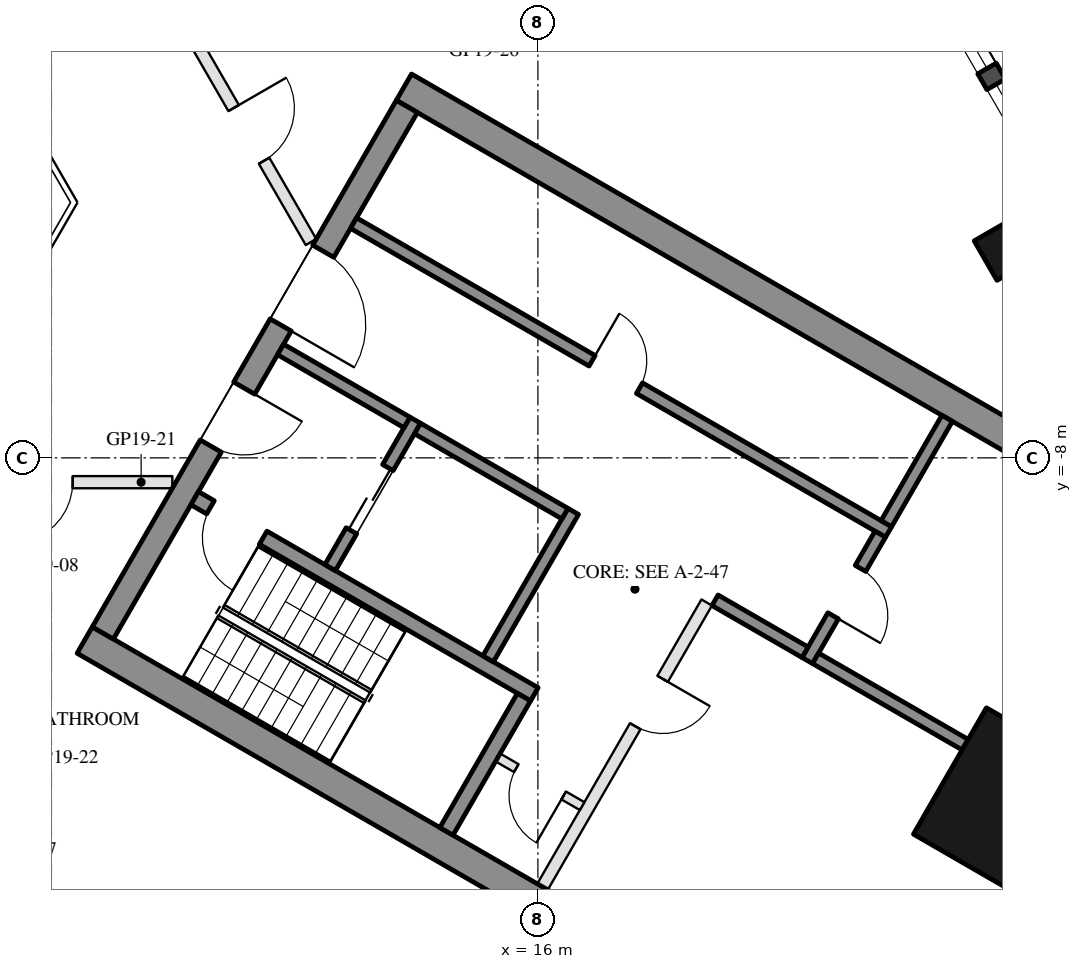
"""IFC4 building model, lengths in metres.
Left out: names, types, materials, properties, quantities, classifications, styles, units other than length and angle.
Written with IfcOpenShell. Run it as: python <this file> out.ifc"""

import sys

from ifc_helpers import new_model, si_unit, direction, frame, frame_2d, origin, origin_2d, place, context, subcontext, project, spatial, rectangle, hollow_rectangle, extrude, element, fill, save


model = new_model("IFC4")
c1 = context("Model", 3, precision=1e-05, world=origin(), true_north=direction((0.0, 1.0)))
c2 = subcontext(c1, "Body", "Model", "MODEL_VIEW")
j1 = project(units=[si_unit("LENGTHUNIT", "METRE"), si_unit("PLANEANGLEUNIT", "RADIAN")], contexts=[c1])
p1 = place(None, origin())
s1 = spatial("IfcSite", under=j1, at=p1, CompositionType="ELEMENT")
p2 = place(p1, origin())
s2 = spatial("IfcBuilding", under=s1, at=p2, CompositionType="ELEMENT")
p3 = place(p2, frame((0.0, 0.0, 205.8)))
s3 = spatial("IfcBuildingStorey", under=s2, at=p3, CompositionType="ELEMENT", Elevation=205.8)
p4 = place(p3, frame((23.688, -4.568, 0.0), z_axis=(0.0, 0.0, 1.0), x_axis=(-0.5, 0.866025403784, 0.0)))
e1 = element("IfcColumn", 1, at=p4, inside=s3, PredefinedType="COLUMN", context=c2, shape_type="SweptSolid", body=[
    extrude(hollow_rectangle(XDim=0.75, YDim=0.75, WallThickness=0.035, at=origin_2d()), origin(), (0.0, 0.0, 1.0), 3.7),
])
p5 = place(p3, frame((23.729, -13.7, 0.0), z_axis=(0.0, 0.0, 1.0), x_axis=(0.5, 0.866025403784, 0.0)))
e2 = element("IfcColumn", 2, at=p5, inside=s3, PredefinedType="COLUMN", context=c2, shape_type="SweptSolid", body=[
    extrude(hollow_rectangle(XDim=2.4, YDim=2.2, WallThickness=0.06, at=origin_2d()), origin(), (0.0, 0.0, 1.0), 3.7),
])
p6 = place(p3, frame((23.427, -16.792, 0.0), z_axis=(0.0, 0.0, 1.0), x_axis=(0.500018773155, 0.866014564827, 0.0)))
e3 = element("IfcWall", 3, at=p6, inside=s3, PredefinedType="SOLIDWALL", context=c2, shape_type="SweptSolid", body=[
    extrude(rectangle(XDim=5.658, YDim=0.35, at=frame_2d((2.829, 0.0))), origin(), (0.0, 0.0, 1.0), 3.55),
])
p7 = place(p3, frame((26.257, -6.567, 0.0), z_axis=(0.0, 0.0, 1.0), x_axis=(-0.500023526245, 0.866011820475, 0.0)))
e4 = element("IfcWall", 4, at=p7, inside=s3, PredefinedType="SOLIDWALL", context=c2, shape_type="SweptSolid", body=[
    extrude(rectangle(XDim=11.816, YDim=0.35, at=frame_2d((5.908, 0.0))), origin(), (0.0, 0.0, 1.0), 3.55),
])
p8 = place(p7, frame((0.38, 0.0, 0.3)))
e5 = element("IfcOpeningElement", 5, at=p8, cuts=e4, PredefinedType="OPENING", context=c2, shape_type="SweptSolid", body=[
    extrude(rectangle(XDim=1.9, YDim=2.65, at=frame_2d((0.95, 1.325))), frame((0.0, 0.185, 0.0), z_axis=(0.0, -1.0, 0.0), x_axis=(1.0, 0.0, 0.0)), (0.0, 0.0, 1.0), 0.37),
])
p9 = place(p7, frame((7.791, 0.0, 0.0)))
e6 = element("IfcOpeningElement", 6, at=p9, cuts=e4, PredefinedType="OPENING", context=c2, shape_type="SweptSolid", body=[
    extrude(rectangle(XDim=2.4, YDim=2.4, at=frame_2d((1.2, 1.2))), frame((0.0, 0.185, 0.0), z_axis=(0.0, -1.0, 0.0), x_axis=(1.0, 0.0, 0.0)), (0.0, 0.0, 1.0), 0.37),
])
p10 = place(p7, frame((3.741, 0.0, 0.3)))
e7 = element("IfcOpeningElement", 7, at=p10, cuts=e4, PredefinedType="OPENING", context=c2, shape_type="SweptSolid", body=[
    extrude(rectangle(XDim=1.7, YDim=2.65, at=frame_2d((0.85, 1.325))), frame((0.0, 0.185, 0.0), z_axis=(0.0, -1.0, 0.0), x_axis=(1.0, 0.0, 0.0)), (0.0, 0.0, 1.0), 0.37),
])
p11 = place(p7, frame((5.741, 0.0, 0.3)))
e8 = element("IfcOpeningElement", 8, at=p11, cuts=e4, PredefinedType="OPENING", context=c2, shape_type="SweptSolid", body=[
    extrude(rectangle(XDim=1.7, YDim=2.65, at=frame_2d((0.85, 1.325))), frame((0.0, 0.185, 0.0), z_axis=(0.0, -1.0, 0.0), x_axis=(1.0, 0.0, 0.0)), (0.0, 0.0, 1.0), 0.37),
])
for number, where, z_axis, x_axis in (
    (9, (8.547, -10.997, 0.0), (0.0, 0.0, 1.0), (0.866, -0.5, 0.0)),
    (10, (13.797, -1.903, 0.0), (0.0, 0.0, 1.0), (0.866, -0.5, 0.0)),
):
    element("IfcWall", number, at=place(p3, frame(where, z_axis=z_axis, x_axis=x_axis)), inside=s3, PredefinedType="SHEAR", context=c2, shape_type="SweptSolid", body=[
        extrude(rectangle(XDim=14.837, YDim=0.5, at=frame_2d((7.418, 0.0))), origin(), (0.0, 0.0, 1.0), 3.5),
    ])
p12 = place(p3, frame((8.845, -10.88, 0.0), z_axis=(0.0, 0.0, 1.0), x_axis=(0.500004234368, 0.866022959057, 0.0)))
e11 = element("IfcWall", 11, at=p12, inside=s3, PredefinedType="SHEAR", context=c2, shape_type="SweptSolid", body=[
    extrude(rectangle(XDim=10.0, YDim=0.4, at=frame_2d((5.0, 0.0))), origin(), (0.0, 0.0, 1.0), 3.5),
])
p13 = place(p12, frame((3.55, 0.0, 0.0)))
e12 = element("IfcOpeningElement", 12, at=p13, cuts=e11, PredefinedType="OPENING", context=c2, shape_type="SweptSolid", body=[
    extrude(rectangle(XDim=1.1, YDim=2.1, at=frame_2d((0.55, 1.05))), frame((0.0, 0.21, 0.0), z_axis=(0.0, -1.0, 0.0), x_axis=(1.0, 0.0, 0.0)), (0.0, 0.0, 1.0), 0.42),
])
p14 = place(p12, frame((5.85, 0.0, 0.0)))
e13 = element("IfcOpeningElement", 13, at=p14, cuts=e11, PredefinedType="OPENING", context=c2, shape_type="SweptSolid", body=[
    extrude(rectangle(XDim=1.4, YDim=2.1, at=frame_2d((0.7, 1.05))), frame((0.0, 0.21, 0.0), z_axis=(0.0, -1.0, 0.0), x_axis=(1.0, 0.0, 0.0)), (0.0, 0.0, 1.0), 0.42),
])
p15 = place(p3, frame((10.356, -8.664, 0.0), z_axis=(0.0, 0.0, 1.0), x_axis=(0.866028629588, -0.499994412703, 0.0)))
e14 = element("IfcWall", 14, at=p15, inside=s3, PredefinedType="SHEAR", context=c2, shape_type="SweptSolid", body=[
    extrude(rectangle(XDim=6.45, YDim=0.25, at=frame_2d((3.225, 0.0))), origin(), (0.0, 0.0, 1.0), 3.5),
])
p16 = place(p15, frame((0.3, 0.0, 0.0)))
e15 = element("IfcOpeningElement", 15, at=p16, cuts=e14, PredefinedType="OPENING", context=c2, shape_type="SweptSolid", body=[
    extrude(rectangle(XDim=1.0, YDim=2.1, at=frame_2d((0.5, 1.05))), frame((0.0, 0.135, 0.0), z_axis=(0.0, -1.0, 0.0), x_axis=(1.0, 0.0, 0.0)), (0.0, 0.0, 1.0), 0.27),
])
p17 = place(p3, frame((14.496, -14.143, 0.0), z_axis=(0.0, 0.0, 1.0), x_axis=(0.500062241894, 0.865989465428, 0.0)))
e16 = element("IfcWall", 16, at=p17, inside=s3, PredefinedType="SHEAR", context=c2, shape_type="SweptSolid", body=[
    extrude(rectangle(XDim=2.55, YDim=0.25, at=frame_2d((1.275, 0.0))), origin(), (0.0, 0.0, 1.0), 3.5),
])
p18 = place(p3, frame((15.181, -11.305, 0.0), z_axis=(0.0, 0.0, 1.0), x_axis=(0.49994636267, 0.866056369097, 0.0)))
e17 = element("IfcWall", 17, at=p18, inside=s3, PredefinedType="SHEAR", context=c2, shape_type="SweptSolid", body=[
    extrude(rectangle(XDim=2.8, YDim=0.2, at=frame_2d((1.4, 0.0))), origin(), (0.0, 0.0, 1.0), 3.5),
])
p19 = place(p3, frame((12.583, -9.805, 0.0), z_axis=(0.0, 0.0, 1.0), x_axis=(0.49994636267, 0.866056369097, 0.0)))
e18 = element("IfcWall", 18, at=p19, inside=s3, PredefinedType="SHEAR", context=c2, shape_type="SweptSolid", body=[
    extrude(rectangle(XDim=2.8, YDim=0.2, at=frame_2d((1.4, 0.0))), origin(), (0.0, 0.0, 1.0), 3.5),
])
p20 = place(p19, frame((0.7, 0.0, 0.0)))
e19 = element("IfcOpeningElement", 19, at=p20, cuts=e18, PredefinedType="OPENING", context=c2, shape_type="SweptSolid", body=[
    extrude(rectangle(XDim=1.2, YDim=2.1, at=frame_2d((0.6, 1.05))), frame((0.0, 0.11, 0.0), z_axis=(0.0, -1.0, 0.0), x_axis=(1.0, 0.0, 0.0)), (0.0, 0.0, 1.0), 0.22),
])
p21 = place(p3, frame((11.768, -6.217, 0.0), z_axis=(0.0, 0.0, 1.0), x_axis=(0.866050077142, -0.499957262057, 0.0)))
e20 = element("IfcWall", 20, at=p21, inside=s3, PredefinedType="SHEAR", context=c2, shape_type="SweptSolid", body=[
    extrude(rectangle(XDim=2.4, YDim=0.2, at=frame_2d((1.2, 0.0))), origin(), (0.0, 0.0, 1.0), 3.5),
])
p22 = place(p3, frame((14.02, -7.517, 0.0), z_axis=(0.0, 0.0, 1.0), x_axis=(0.866034573852, -0.49998411664, 0.0)))
e21 = element("IfcWall", 21, at=p22, inside=s3, PredefinedType="SHEAR", context=c2, shape_type="SweptSolid", body=[
    extrude(rectangle(XDim=2.8, YDim=0.2, at=frame_2d((1.4, 0.0))), origin(), (0.0, 0.0, 1.0), 3.5),
])
p23 = place(p3, frame((12.968, -4.138, 0.0), z_axis=(0.0, 0.0, 1.0), x_axis=(0.866028328073, -0.49999493495, 0.0)))
e22 = element("IfcWall", 22, at=p23, inside=s3, PredefinedType="SHEAR", context=c2, shape_type="SweptSolid", body=[
    extrude(rectangle(XDim=10.16, YDim=0.2, at=frame_2d((5.08, 0.0))), origin(), (0.0, 0.0, 1.0), 3.5),
])
p24 = place(p23, frame((4.53, 0.0, 0.0)))
e23 = element("IfcOpeningElement", 23, at=p24, cuts=e22, PredefinedType="OPENING", context=c2, shape_type="SweptSolid", body=[
    extrude(rectangle(XDim=0.9, YDim=2.1, at=frame_2d((0.45, 1.05))), frame((0.0, 0.11, 0.0), z_axis=(0.0, -1.0, 0.0), x_axis=(1.0, 0.0, 0.0)), (0.0, 0.0, 1.0), 0.22),
])
p25 = place(p3, frame((20.43, -11.333, 0.0), z_axis=(0.0, 0.0, 1.0), x_axis=(0.500001309137, 0.866024647952, 0.0)))
e24 = element("IfcWall", 24, at=p25, inside=s3, PredefinedType="SHEAR", context=c2, shape_type="SweptSolid", body=[
    extrude(rectangle(XDim=2.4, YDim=0.2, at=frame_2d((1.2, 0.0))), origin(), (0.0, 0.0, 1.0), 3.5),
])
p26 = place(p25, frame((0.85, 0.0, 0.0)))
e25 = element("IfcOpeningElement", 25, at=p26, cuts=e24, PredefinedType="OPENING", context=c2, shape_type="SweptSolid", body=[
    extrude(rectangle(XDim=0.9, YDim=2.1, at=frame_2d((0.45, 1.05))), frame((0.0, 0.11, 0.0), z_axis=(0.0, -1.0, 0.0), x_axis=(1.0, 0.0, 0.0)), (0.0, 0.0, 1.0), 0.22),
])
p27 = place(p3, frame((18.913, -10.342, 0.0), z_axis=(0.0, 0.0, 1.0), x_axis=(0.866038183914, -0.499977863513, 0.0)))
e26 = element("IfcWall", 26, at=p27, inside=s3, PredefinedType="SHEAR", context=c2, shape_type="SweptSolid", body=[
    extrude(rectangle(XDim=1.71, YDim=0.2, at=frame_2d((0.855, 0.0))), origin(), (0.0, 0.0, 1.0), 3.5),
])
p28 = place(p3, frame((21.73, -9.082, 0.0), z_axis=(0.0, 0.0, 1.0), x_axis=(0.50002537861, 0.866010750942, 0.0)))
e27 = element("IfcWall", 27, at=p28, inside=s3, PredefinedType="SHEAR", context=c2, shape_type="SweptSolid", body=[
    extrude(rectangle(XDim=2.0, YDim=0.2, at=frame_2d((1.0, 0.0))), origin(), (0.0, 0.0, 1.0), 3.5),
])
p29 = place(p3, frame((20.567, -11.297, 0.0), z_axis=(0.0, 0.0, 1.0), x_axis=(0.866055327414, -0.49994816717, 0.0)))
e28 = element("IfcWall", 28, at=p29, inside=s3, PredefinedType="SHEAR", context=c2, shape_type="SweptSolid", body=[
    extrude(rectangle(XDim=2.84, YDim=0.2, at=frame_2d((1.42, 0.0))), origin(), (0.0, 0.0, 1.0), 3.5),
])
p30 = place(p3, frame((16.076, -15.055, 0.0), z_axis=(0.0, 0.0, 1.0), x_axis=(0.499995103361, 0.866028230842, 0.0)))
e29 = element("IfcWall", 29, at=p30, inside=s3, PredefinedType="PARTITIONING", context=c2, shape_type="SweptSolid", body=[
    extrude(rectangle(XDim=5.4, YDim=0.2, at=frame_2d((2.7, 0.0))), origin(), (0.0, 0.0, 1.0), 3.5),
])
p31 = place(p30, frame((3.05, 0.0, 0.0)))
e30 = element("IfcOpeningElement", 30, at=p31, cuts=e29, PredefinedType="OPENING", context=c2, shape_type="SweptSolid", body=[
    extrude(rectangle(XDim=0.9, YDim=2.1, at=frame_2d((0.45, 1.05))), frame((0.0, 0.11, 0.0), z_axis=(0.0, -1.0, 0.0), x_axis=(1.0, 0.0, 0.0)), (0.0, 0.0, 1.0), 0.22),
])
p32 = place(p3, frame((15.342, -12.928, 0.0), z_axis=(0.0, 0.0, 1.0), x_axis=(0.865989903783, -0.500061482766, 0.0)))
e31 = element("IfcWall", 31, at=p32, inside=s3, PredefinedType="PARTITIONING", context=c2, shape_type="SweptSolid", body=[
    extrude(rectangle(XDim=1.6, YDim=0.15, at=frame_2d((0.8, 0.0))), origin(), (0.0, 0.0, 1.0), 3.5),
])
p33 = place(p32, frame((0.35, 0.0, 0.0)))
e32 = element("IfcOpeningElement", 32, at=p33, cuts=e31, PredefinedType="OPENING", context=c2, shape_type="SweptSolid", body=[
    extrude(rectangle(XDim=0.9, YDim=2.1, at=frame_2d((0.45, 1.05))), frame((0.0, 0.085, 0.0), z_axis=(0.0, -1.0, 0.0), x_axis=(1.0, 0.0, 0.0)), (0.0, 0.0, 1.0), 0.17),
])
p34 = place(p3, frame((9.988, -8.4, 0.0), z_axis=(0.0, 0.0, 1.0), x_axis=(-1.0, 0.0, 0.0)))
e33 = element("IfcWall", 33, at=p34, inside=s3, PredefinedType="PARTITIONING", context=c2, shape_type="SweptSolid", body=[
    extrude(rectangle(XDim=4.277, YDim=0.2, at=frame_2d((2.139, 0.0))), origin(), (0.0, 0.0, 1.0), 2.95),
])
p35 = place(p34, frame((1.639, 0.0, 0.0)))
e34 = element("IfcOpeningElement", 34, at=p35, cuts=e33, PredefinedType="OPENING", context=c2, shape_type="SweptSolid", body=[
    extrude(rectangle(XDim=1.0, YDim=2.1, at=frame_2d((0.5, 1.05))), frame((0.0, 0.11, 0.0), z_axis=(0.0, -1.0, 0.0), x_axis=(1.0, 0.0, 0.0)), (0.0, 0.0, 1.0), 0.22),
])
p36 = place(p3, frame((10.225, -0.909, 0.0), z_axis=(0.0, 0.0, 1.0), x_axis=(0.500011931275, -0.86601851515, 0.0)))
e35 = element("IfcWall", 35, at=p36, inside=s3, PredefinedType="PARTITIONING", context=c2, shape_type="SweptSolid", body=[
    extrude(rectangle(XDim=4.088, YDim=0.2, at=frame_2d((2.044, 0.0))), origin(), (0.0, 0.0, 1.0), 2.95),
])
p37 = place(p36, frame((1.544, 0.0, 0.0)))
e36 = element("IfcOpeningElement", 36, at=p37, cuts=e35, PredefinedType="OPENING", context=c2, shape_type="SweptSolid", body=[
    extrude(rectangle(XDim=1.0, YDim=2.1, at=frame_2d((0.5, 1.05))), frame((0.0, 0.11, 0.0), z_axis=(0.0, -1.0, 0.0), x_axis=(1.0, 0.0, 0.0)), (0.0, 0.0, 1.0), 0.22),
])
p38 = place(p10, origin())
e37 = element("IfcWindow", 37, at=p38, inside=s3, PartitioningType="SINGLE_PANEL", PredefinedType="WINDOW", context=c2, shape_type="SweptSolid", body=[
    extrude(rectangle(XDim=1.7, YDim=2.65, at=frame_2d((0.85, 1.325))), frame((0.0, 0.03, 0.0), z_axis=(0.0, -1.0, 0.0), x_axis=(1.0, 0.0, 0.0)), (0.0, 0.0, 1.0), 0.06),
])
fill(e7, e37)
p39 = place(p11, origin())
e38 = element("IfcWindow", 38, at=p39, inside=s3, PartitioningType="SINGLE_PANEL", PredefinedType="WINDOW", context=c2, shape_type="SweptSolid", body=[
    extrude(rectangle(XDim=1.7, YDim=2.65, at=frame_2d((0.85, 1.325))), frame((0.0, 0.03, 0.0), z_axis=(0.0, -1.0, 0.0), x_axis=(1.0, 0.0, 0.0)), (0.0, 0.0, 1.0), 0.06),
])
fill(e8, e38)
p40 = place(p20, origin())
e39 = element("IfcDoor", 39, at=p40, inside=s3, OperationType="DOUBLE_DOOR_SLIDING", PredefinedType="DOOR", context=c2, shape_type="SweptSolid", body=[
    extrude(rectangle(XDim=1.2, YDim=2.1, at=frame_2d((0.6, 1.05))), frame((0.0, 0.025, 0.0), z_axis=(0.0, -1.0, 0.0), x_axis=(1.0, 0.0, 0.0)), (0.0, 0.0, 1.0), 0.05),
])
fill(e19, e39)
p41 = place(p33, frame((0.9, 0.0, 0.0), z_axis=(0.0, 0.0, 1.0), x_axis=(-1.0, 0.0, 0.0)))
e40 = element("IfcDoor", 40, at=p41, inside=s3, OperationType="SINGLE_SWING_LEFT", PredefinedType="DOOR", context=c2, shape_type="SweptSolid", body=[
    extrude(rectangle(XDim=0.9, YDim=2.1, at=frame_2d((0.45, 1.05))), frame((0.0, 0.025, 0.0), z_axis=(0.0, -1.0, 0.0), x_axis=(1.0, 0.0, 0.0)), (0.0, 0.0, 1.0), 0.05),
])
fill(e32, e40)
p42 = place(p24, origin())
e41 = element("IfcDoor", 41, at=p42, inside=s3, OperationType="SINGLE_SWING_LEFT", PredefinedType="DOOR", context=c2, shape_type="SweptSolid", body=[
    extrude(rectangle(XDim=0.9, YDim=2.1, at=frame_2d((0.45, 1.05))), frame((0.0, 0.025, 0.0), z_axis=(0.0, -1.0, 0.0), x_axis=(1.0, 0.0, 0.0)), (0.0, 0.0, 1.0), 0.05),
])
fill(e23, e41)
p43 = place(p26, frame((0.9, 0.0, 0.0), z_axis=(0.0, 0.0, 1.0), x_axis=(-1.0, 0.0, 0.0)))
e42 = element("IfcDoor", 42, at=p43, inside=s3, OperationType="SINGLE_SWING_RIGHT", PredefinedType="DOOR", context=c2, shape_type="SweptSolid", body=[
    extrude(rectangle(XDim=0.9, YDim=2.1, at=frame_2d((0.45, 1.05))), frame((0.0, 0.025, 0.0), z_axis=(0.0, -1.0, 0.0), x_axis=(1.0, 0.0, 0.0)), (0.0, 0.0, 1.0), 0.05),
])
fill(e25, e42)
p44 = place(p31, frame((0.9, 0.0, 0.0), z_axis=(0.0, 0.0, 1.0), x_axis=(-1.0, 0.0, 0.0)))
e43 = element("IfcDoor", 43, at=p44, inside=s3, OperationType="SINGLE_SWING_LEFT", PredefinedType="DOOR", context=c2, shape_type="SweptSolid", body=[
    extrude(rectangle(XDim=0.9, YDim=2.1, at=frame_2d((0.45, 1.05))), frame((0.0, 0.025, 0.0), z_axis=(0.0, -1.0, 0.0), x_axis=(1.0, 0.0, 0.0)), (0.0, 0.0, 1.0), 0.05),
])
fill(e30, e43)
p45 = place(p13, frame((1.1, 0.0, 0.0), z_axis=(0.0, 0.0, 1.0), x_axis=(-1.0, 0.0, 0.0)))
e44 = element("IfcDoor", 44, at=p45, inside=s3, OperationType="SINGLE_SWING_LEFT", PredefinedType="DOOR", context=c2, shape_type="SweptSolid", body=[
    extrude(rectangle(XDim=1.1, YDim=2.1, at=frame_2d((0.55, 1.05))), frame((0.0, 0.025, 0.0), z_axis=(0.0, -1.0, 0.0), x_axis=(1.0, 0.0, 0.0)), (0.0, 0.0, 1.0), 0.05),
])
fill(e12, e44)
p46 = place(p14, frame((1.4, 0.0, 0.0), z_axis=(0.0, 0.0, 1.0), x_axis=(-1.0, 0.0, 0.0)))
e45 = element("IfcDoor", 45, at=p46, inside=s3, OperationType="DOUBLE_DOOR_SINGLE_SWING", PredefinedType="DOOR", context=c2, shape_type="SweptSolid", body=[
    extrude(rectangle(XDim=1.4, YDim=2.1, at=frame_2d((0.7, 1.05))), frame((0.0, 0.025, 0.0), z_axis=(0.0, -1.0, 0.0), x_axis=(1.0, 0.0, 0.0)), (0.0, 0.0, 1.0), 0.05),
])
fill(e13, e45)
p47 = place(p16, frame((1.0, 0.0, 0.0), z_axis=(0.0, 0.0, 1.0), x_axis=(-1.0, 0.0, 0.0)))
e46 = element("IfcDoor", 46, at=p47, inside=s3, OperationType="SINGLE_SWING_LEFT", PredefinedType="DOOR", context=c2, shape_type="SweptSolid", body=[
    extrude(rectangle(XDim=1.0, YDim=2.1, at=frame_2d((0.5, 1.05))), frame((0.0, 0.025, 0.0), z_axis=(0.0, -1.0, 0.0), x_axis=(1.0, 0.0, 0.0)), (0.0, 0.0, 1.0), 0.05),
])
fill(e15, e46)
p48 = place(p35, origin())
e47 = element("IfcDoor", 47, at=p48, inside=s3, OperationType="SINGLE_SWING_RIGHT", PredefinedType="DOOR", context=c2, shape_type="SweptSolid", body=[
    extrude(rectangle(XDim=1.0, YDim=2.1, at=frame_2d((0.5, 1.05))), frame((0.0, 0.025, 0.0), z_axis=(0.0, -1.0, 0.0), x_axis=(1.0, 0.0, 0.0)), (0.0, 0.0, 1.0), 0.05),
])
fill(e34, e47)
p49 = place(p37, origin())
e48 = element("IfcDoor", 48, at=p49, inside=s3, OperationType="SINGLE_SWING_LEFT", PredefinedType="DOOR", context=c2, shape_type="SweptSolid", body=[
    extrude(rectangle(XDim=1.0, YDim=2.1, at=frame_2d((0.5, 1.05))), frame((0.0, 0.025, 0.0), z_axis=(0.0, -1.0, 0.0), x_axis=(1.0, 0.0, 0.0)), (0.0, 0.0, 1.0), 0.05),
])
fill(e36, e48)
save(model, sys.argv[1])
